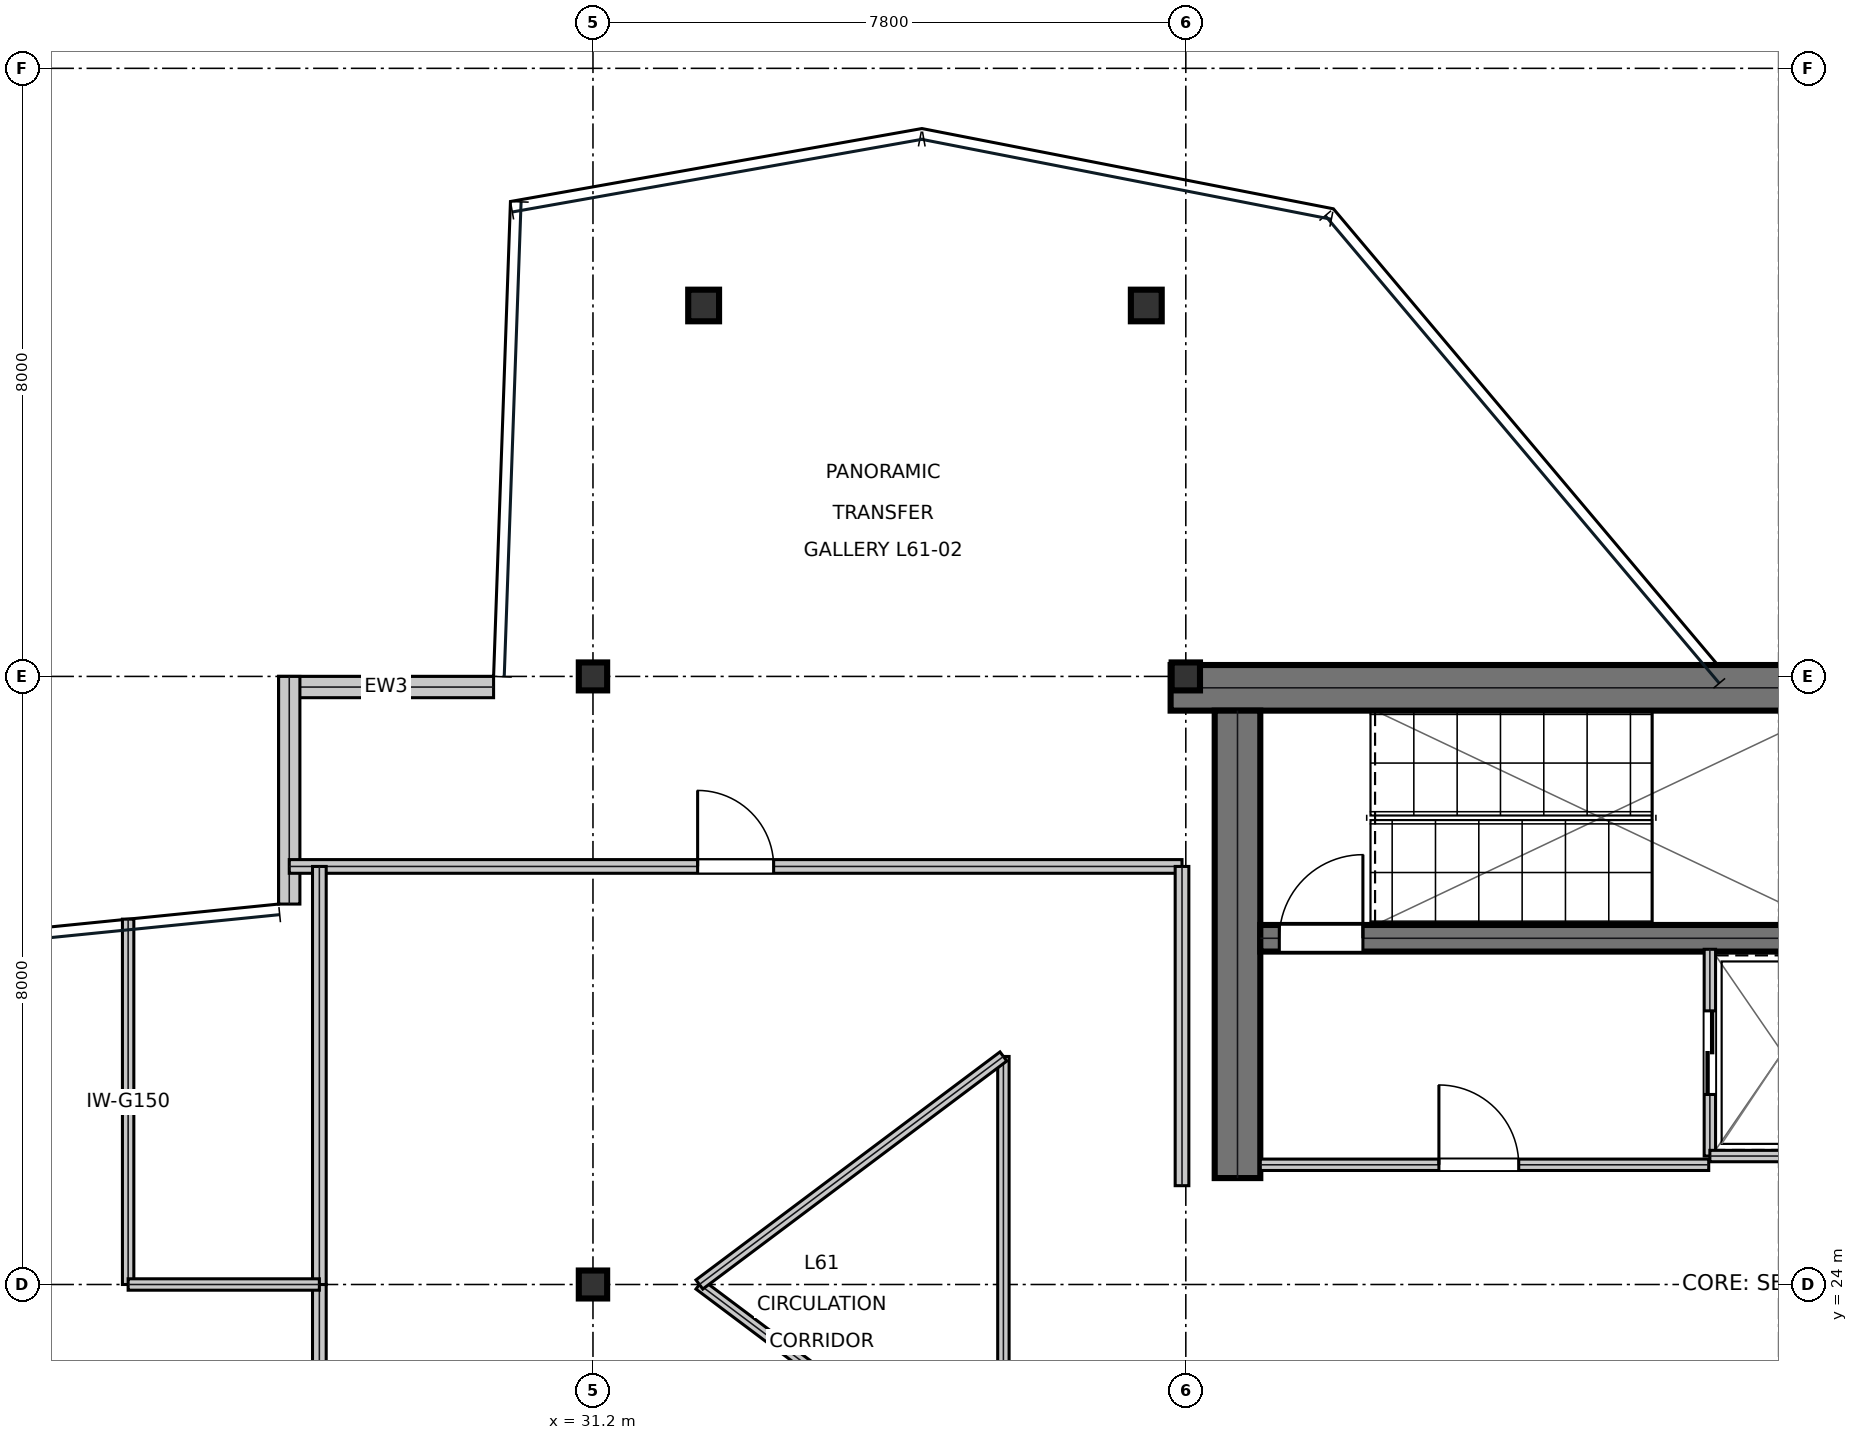
"""IFC4 building model, lengths in metres.
Left out: names, types, materials, properties, quantities, classifications, styles, units other than length and angle.
Written with IfcOpenShell. Run it as: python <this file> out.ifc"""

import sys

from ifc_helpers import new_model, si_unit, direction, frame, frame_2d, origin, origin_2d, place, context, subcontext, project, spatial, rectangle, i_section, extrude, element, fill, save


model = new_model("IFC4")
c1 = context("Model", 3, precision=1e-05, world=origin(), true_north=direction((0.0, 1.0)))
c2 = subcontext(c1, "Body", "Model", "MODEL_VIEW")
j1 = project(units=[si_unit("LENGTHUNIT", "METRE"), si_unit("PLANEANGLEUNIT", "RADIAN")], contexts=[c1])
p1 = place(None, origin())
s1 = spatial("IfcSite", under=j1, at=p1, CompositionType="ELEMENT")
p2 = place(p1, origin())
s2 = spatial("IfcBuilding", under=s1, at=p2, CompositionType="ELEMENT")
p3 = place(p2, frame((0.0, 0.0, 262.05)))
s3 = spatial("IfcBuildingStorey", under=s2, at=p3, CompositionType="ELEMENT", Elevation=262.05)
p4 = place(p3, frame((38.8, 31.85, 0.0), z_axis=(0.0, 0.0, 1.0), x_axis=(1.0, 0.0, 0.0)))
e1 = element("IfcWall", 1, at=p4, inside=s3, PredefinedType="SHEAR", context=c2, shape_type="SweptSolid", body=[
    extrude(rectangle(XDim=16.0, YDim=0.6, at=frame_2d((8.0, 0.0))), origin(), (0.0, 0.0, 1.0), 4.56),
])
p5 = place(p3, frame((39.68, 25.4, 0.0), z_axis=(0.0, 0.0, 1.0), x_axis=(0.0, 1.0, 0.0)))
e2 = element("IfcWall", 2, at=p5, inside=s3, PredefinedType="SHEAR", context=c2, shape_type="SweptSolid", body=[
    extrude(rectangle(XDim=6.15, YDim=0.6, at=frame_2d((3.075, 0.0))), origin(), (0.0, 0.0, 1.0), 4.56),
])
p6 = place(p3, frame((39.98, 28.555, 0.0), z_axis=(0.0, 0.0, 1.0), x_axis=(1.0, 0.0, 0.0)))
e3 = element("IfcWall", 3, at=p6, inside=s3, PredefinedType="SHEAR", context=c2, shape_type="SweptSolid", body=[
    extrude(rectangle(XDim=7.71, YDim=0.35, at=frame_2d((3.855, 0.0))), origin(), (0.0, 0.0, 1.0), 4.56),
])
p7 = place(p6, frame((0.25, 0.0, 0.0)))
e4 = element("IfcOpeningElement", 4, at=p7, cuts=e3, PredefinedType="OPENING", context=c2, shape_type="SweptSolid", body=[
    extrude(rectangle(XDim=1.1, YDim=2.15, at=frame_2d((0.55, 1.075))), frame((0.0, 0.185, 0.0), z_axis=(0.0, -1.0, 0.0), x_axis=(1.0, 0.0, 0.0)), (0.0, 0.0, 1.0), 0.37),
])
for number, where, z_axis, x_axis in (
    (5, (31.2, 24.0, 0.0), (0.0, 0.0, 1.0), (1.0, 0.0, 0.0)),
    (6, (31.2, 32.0, 0.0), (0.0, 0.0, 1.0), (1.0, 0.0, 0.0)),
    (7, (39.0, 32.0, 0.0), (0.0, 0.0, 1.0), (1.0, 0.0, 0.0)),
):
    element("IfcColumn", number, at=place(p3, frame(where, z_axis=z_axis, x_axis=x_axis)), inside=s3, PredefinedType="COLUMN", context=c2, shape_type="SweptSolid", body=[
        extrude(i_section(OverallWidth=0.373, OverallDepth=0.368, WebThickness=0.015, FlangeThickness=0.024, at=origin_2d()), origin(), (0.0, 0.0, 1.0), 4.794),
    ])
p8 = place(p3, frame((32.656, 36.88, 0.016), z_axis=(0.010544588521, -0.022624796729, 0.999688416571), x_axis=(0.906392585431, 0.422436363345, 0.0)))
e8 = element("IfcColumn", 8, at=p8, inside=s3, PredefinedType="COLUMN", context=c2, shape_type="SweptSolid", body=[
    extrude(i_section(OverallWidth=0.406, OverallDepth=0.416, WebThickness=0.03, FlangeThickness=0.048, at=origin_2d()), origin(), (0.0, 0.0, 1.0), 4.77),
])
p9 = place(p3, frame((38.48, 36.88, 0.016), z_axis=(-0.003788045318, -0.022625892307, 0.999736825225), x_axis=(0.986273042842, -0.165122636132, 0.0)))
e9 = element("IfcColumn", 9, at=p9, inside=s3, PredefinedType="COLUMN", context=c2, shape_type="SweptSolid", body=[
    extrude(i_section(OverallWidth=0.406, OverallDepth=0.416, WebThickness=0.03, FlangeThickness=0.048, at=origin_2d()), origin(), (0.0, 0.0, 1.0), 4.769),
])
p10 = place(p3, frame((29.892, 31.86, 0.0), z_axis=(0.0, 0.0, 1.0), x_axis=(-1.0, 0.0, 0.0)))
e10 = element("IfcWall", 10, at=p10, inside=s3, PredefinedType="STANDARD", context=c2, shape_type="SweptSolid", body=[
    extrude(rectangle(XDim=2.828, YDim=0.28, at=frame_2d((1.414, 0.0))), origin(), (0.0, 0.0, 1.0), 4.56),
])
p11 = place(p3, frame((27.204, 32.0, 0.0), z_axis=(0.0, 0.0, 1.0), x_axis=(0.0, -1.0, 0.0)))
e11 = element("IfcWall", 11, at=p11, inside=s3, PredefinedType="STANDARD", context=c2, shape_type="SweptSolid", body=[
    extrude(rectangle(XDim=2.995, YDim=0.28, at=frame_2d((1.498, 0.0))), origin(), (0.0, 0.0, 1.0), 4.089),
])
p12 = place(p3, frame((39.98, 25.575, 0.0), z_axis=(0.0, 0.0, 1.0), x_axis=(1.0, 0.0, 0.0)))
e12 = element("IfcWall", 12, at=p12, inside=s3, PredefinedType="PARTITIONING", context=c2, shape_type="SweptSolid", body=[
    extrude(rectangle(XDim=5.9, YDim=0.15, at=frame_2d((2.95, 0.0))), origin(), (0.0, 0.0, 1.0), 4.56),
])
p13 = place(p12, frame((2.35, 0.0, 0.0)))
e13 = element("IfcOpeningElement", 13, at=p13, cuts=e12, PredefinedType="OPENING", context=c2, shape_type="SweptSolid", body=[
    extrude(rectangle(XDim=1.05, YDim=2.15, at=frame_2d((0.525, 1.075))), frame((0.0, 0.085, 0.0), z_axis=(0.0, -1.0, 0.0), x_axis=(1.0, 0.0, 0.0)), (0.0, 0.0, 1.0), 0.17),
])
p14 = place(p3, frame((45.895, 25.69, 0.0), z_axis=(0.0, 0.0, 1.0), x_axis=(0.0, 1.0, 0.0)))
e14 = element("IfcWall", 14, at=p14, inside=s3, PredefinedType="PARTITIONING", context=c2, shape_type="SweptSolid", body=[
    extrude(rectangle(XDim=2.72, YDim=0.15, at=frame_2d((1.36, 0.0))), origin(), (0.0, 0.0, 1.0), 4.56),
])
p15 = place(p14, frame((0.81, 0.0, 0.0)))
e15 = element("IfcOpeningElement", 15, at=p15, cuts=e14, PredefinedType="OPENING", context=c2, shape_type="SweptSolid", body=[
    extrude(rectangle(XDim=1.1, YDim=2.15, at=frame_2d((0.55, 1.075))), frame((0.0, 0.085, 0.0), z_axis=(0.0, -1.0, 0.0), x_axis=(1.0, 0.0, 0.0)), (0.0, 0.0, 1.0), 0.17),
])
p16 = place(p3, frame((45.895, 25.69, 0.0), z_axis=(0.0, 0.0, 1.0), x_axis=(1.0, 0.0, 0.0)))
e16 = element("IfcWall", 16, at=p16, inside=s3, PredefinedType="PARTITIONING", context=c2, shape_type="SweptSolid", body=[
    extrude(rectangle(XDim=1.915, YDim=0.15, at=frame_2d((0.958, 0.0))), origin(), (0.0, 0.0, 1.0), 4.56),
])
p17 = place(p3, frame((27.204, 29.5, 0.0), z_axis=(0.0, 0.0, 1.0), x_axis=(1.0, 0.0, 0.0)))
e17 = element("IfcWall", 17, at=p17, inside=s3, PredefinedType="SOLIDWALL", context=c2, shape_type="SweptSolid", body=[
    extrude(rectangle(XDim=11.746, YDim=0.18, at=frame_2d((5.873, 0.0))), origin(), (0.0, 0.0, 1.0), 4.02),
])
p18 = place(p17, frame((5.373, 0.0, 0.0)))
e18 = element("IfcOpeningElement", 18, at=p18, cuts=e17, PredefinedType="OPENING", context=c2, shape_type="SweptSolid", body=[
    extrude(rectangle(XDim=1.0, YDim=2.15, at=frame_2d((0.5, 1.075))), frame((0.0, 0.1, 0.0), z_axis=(0.0, -1.0, 0.0), x_axis=(1.0, 0.0, 0.0)), (0.0, 0.0, 1.0), 0.2),
])
for number, where, z_axis, x_axis in (
    (19, (27.6, 18.5, 0.0), (0.0, 0.0, 1.0), (0.0, 1.0, 0.0)),
    (20, (27.6, 24.0, 0.0), (0.0, 0.0, 1.0), (0.0, 1.0, 0.0)),
):
    element("IfcWall", number, at=place(p3, frame(where, z_axis=z_axis, x_axis=x_axis)), inside=s3, PredefinedType="SOLIDWALL", context=c2, shape_type="SweptSolid", body=[
        extrude(rectangle(XDim=5.5, YDim=0.18, at=frame_2d((2.75, 0.0))), origin(), (0.0, 0.0, 1.0), 4.02),
    ])
p19 = place(p3, frame((38.95, 25.3, 0.0), z_axis=(0.0, 0.0, 1.0), x_axis=(0.0, 1.0, 0.0)))
e21 = element("IfcWall", 21, at=p19, inside=s3, PredefinedType="SOLIDWALL", context=c2, shape_type="SweptSolid", body=[
    extrude(rectangle(XDim=4.2, YDim=0.18, at=frame_2d((2.1, 0.0))), origin(), (0.0, 0.0, 1.0), 4.29),
])
p20 = place(p3, frame((25.084, 24.0, 0.0), z_axis=(0.0, 0.0, 1.0), x_axis=(0.0, 1.0, 0.0)))
e22 = element("IfcWall", 22, at=p20, inside=s3, PredefinedType="MOVABLE", context=c2, shape_type="SweptSolid", body=[
    extrude(rectangle(XDim=4.807, YDim=0.15, at=frame_2d((2.403, 0.0))), origin(), (0.0, 0.0, 1.0), 4.02),
])
p21 = place(p3, frame((25.084, 24.0, 0.0), z_axis=(0.0, 0.0, 1.0), x_axis=(1.0, 0.0, 0.0)))
e23 = element("IfcWall", 23, at=p21, inside=s3, PredefinedType="MOVABLE", context=c2, shape_type="SweptSolid", body=[
    extrude(rectangle(XDim=2.516, YDim=0.15, at=frame_2d((1.258, 0.0))), origin(), (0.0, 0.0, 1.0), 4.29),
])
p22 = place(p3, frame((32.6, 24.0, 0.0), z_axis=(0.0, 0.0, 1.0), x_axis=(0.8, -0.6, 0.0)))
e24 = element("IfcWall", 24, at=p22, inside=s3, PredefinedType="MOVABLE", context=c2, shape_type="SweptSolid", body=[
    extrude(rectangle(XDim=5.0, YDim=0.15, at=frame_2d((2.5, 0.0))), origin(), (0.0, 0.0, 1.0), 4.56),
])
p23 = place(p3, frame((36.6, 21.0, 0.0), z_axis=(0.0, 0.0, 1.0), x_axis=(0.0, 1.0, 0.0)))
e25 = element("IfcWall", 25, at=p23, inside=s3, PredefinedType="MOVABLE", context=c2, shape_type="SweptSolid", body=[
    extrude(rectangle(XDim=6.0, YDim=0.15, at=frame_2d((3.0, 0.0))), origin(), (0.0, 0.0, 1.0), 4.56),
])
p24 = place(p3, frame((36.6, 27.0, 0.0), z_axis=(0.0, 0.0, 1.0), x_axis=(-0.8, -0.6, 0.0)))
e26 = element("IfcWall", 26, at=p24, inside=s3, PredefinedType="MOVABLE", context=c2, shape_type="SweptSolid", body=[
    extrude(rectangle(XDim=5.0, YDim=0.15, at=frame_2d((2.5, 0.0))), origin(), (0.0, 0.0, 1.0), 4.56),
])
p25 = place(p13, origin())
e27 = element("IfcDoor", 27, at=p25, inside=s3, OperationType="SINGLE_SWING_LEFT", PredefinedType="DOOR", context=c2, shape_type="SweptSolid", body=[
    extrude(rectangle(XDim=1.05, YDim=2.15, at=frame_2d((0.525, 1.075))), frame((0.0, 0.025, 0.0), z_axis=(0.0, -1.0, 0.0), x_axis=(1.0, 0.0, 0.0)), (0.0, 0.0, 1.0), 0.05),
])
fill(e13, e27)
p26 = place(p15, frame((1.1, 0.0, 0.0), z_axis=(0.0, 0.0, 1.0), x_axis=(-1.0, 0.0, 0.0)))
e28 = element("IfcDoor", 28, at=p26, inside=s3, OperationType="DOUBLE_DOOR_SLIDING", PredefinedType="DOOR", context=c2, shape_type="SweptSolid", body=[
    extrude(rectangle(XDim=1.1, YDim=2.15, at=frame_2d((0.55, 1.075))), frame((0.0, 0.025, 0.0), z_axis=(0.0, -1.0, 0.0), x_axis=(1.0, 0.0, 0.0)), (0.0, 0.0, 1.0), 0.05),
])
fill(e15, e28)
p27 = place(p18, origin())
e29 = element("IfcDoor", 29, at=p27, inside=s3, OperationType="SINGLE_SWING_LEFT", PredefinedType="DOOR", context=c2, shape_type="SweptSolid", body=[
    extrude(rectangle(XDim=1.0, YDim=2.15, at=frame_2d((0.5, 1.075))), frame((0.0, 0.025, 0.0), z_axis=(0.0, -1.0, 0.0), x_axis=(1.0, 0.0, 0.0)), (0.0, 0.0, 1.0), 0.05),
])
fill(e18, e29)
p28 = place(p7, origin())
e30 = element("IfcDoor", 30, at=p28, inside=s3, OperationType="SINGLE_SWING_RIGHT", PredefinedType="DOOR", context=c2, shape_type="SweptSolid", body=[
    extrude(rectangle(XDim=1.1, YDim=2.15, at=frame_2d((0.55, 1.075))), frame((0.0, 0.025, 0.0), z_axis=(0.0, -1.0, 0.0), x_axis=(1.0, 0.0, 0.0)), (0.0, 0.0, 1.0), 0.05),
])
fill(e4, e30)
save(model, sys.argv[1])
